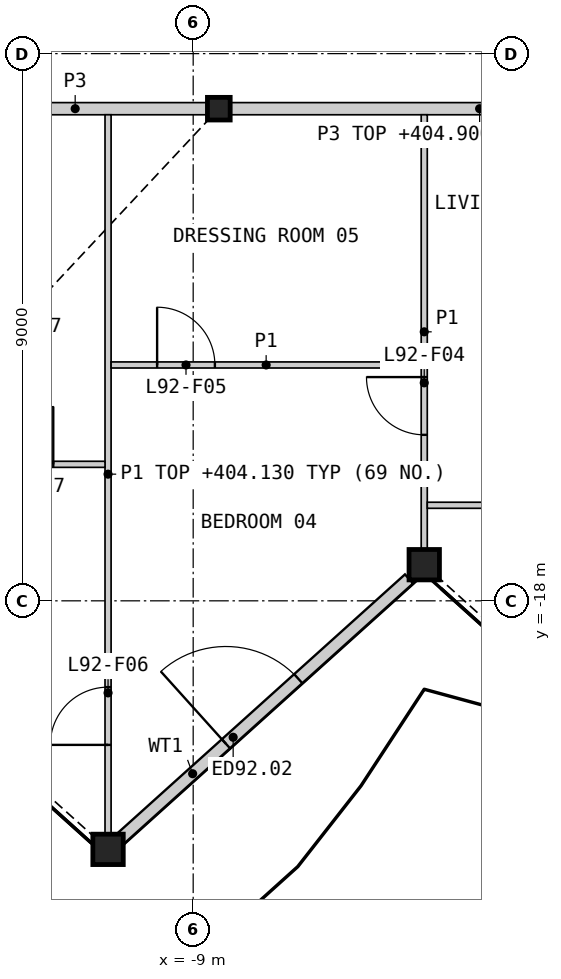
"""IFC4 building model, lengths in metres.
Left out: names, types, materials, properties, quantities, classifications, styles, units other than length and angle.
Written with IfcOpenShell. Run it as: python <this file> out.ifc"""

import sys

from ifc_helpers import new_model, si_unit, direction, frame, frame_2d, origin, origin_2d, place, context, subcontext, project, spatial, rectangle, hollow_rectangle, i_section, extrude, element, fill, save


model = new_model("IFC4")
c1 = context("Model", 3, precision=1e-05, world=origin(), true_north=direction((0.0, 1.0)))
c2 = subcontext(c1, "Body", "Model", "MODEL_VIEW")
j1 = project(units=[si_unit("LENGTHUNIT", "METRE"), si_unit("PLANEANGLEUNIT", "RADIAN")], contexts=[c1])
p1 = place(None, origin())
s1 = spatial("IfcSite", under=j1, at=p1, CompositionType="ELEMENT")
p2 = place(p1, origin())
s2 = spatial("IfcBuilding", under=s1, at=p2, CompositionType="ELEMENT")
p3 = place(p2, frame((0.0, 0.0, 401.8)))
s3 = spatial("IfcBuildingStorey", under=s2, at=p3, CompositionType="ELEMENT", Elevation=401.8)
for number, where, z_axis, x_axis in (
    (1, (-10.4, -22.088, 0.0), (0.0, 0.0, 1.0), (1.0, 0.0, 0.0)),
    (2, (-5.2, -17.406, 0.0), (0.0, 0.0, 1.0), (1.0, 0.0, 0.0)),
):
    element("IfcColumn", number, at=place(p3, frame(where, z_axis=z_axis, x_axis=x_axis)), inside=s3, PredefinedType="COLUMN", context=c2, shape_type="SweptSolid", body=[
        extrude(hollow_rectangle(XDim=0.5, YDim=0.5, WallThickness=0.03, at=origin_2d()), origin(), (0.0, 0.0, 1.0), 3.4),
    ])
p4 = place(p3, frame((-8.578, -9.906, 0.0), z_axis=(0.0, 0.0, 1.0), x_axis=(1.0, 0.0, 0.0)))
e3 = element("IfcColumn", 3, at=p4, inside=s3, PredefinedType="COLUMN", context=c2, shape_type="SweptSolid", body=[
    extrude(i_section(OverallWidth=0.374, OverallDepth=0.372, WebThickness=0.016, FlangeThickness=0.026, at=origin_2d()), origin(), (0.0, 0.0, 1.0), 3.4),
])
p5 = place(p3, frame((-10.195, -21.912, 0.0), z_axis=(0.0, 0.0, 1.0), x_axis=(0.743132515916, 0.669144277259, 0.0)))
e4 = element("IfcWall", 4, at=p5, inside=s3, PredefinedType="SOLIDWALL", context=c2, shape_type="SweptSolid", body=[
    extrude(rectangle(XDim=6.385, YDim=0.2, at=frame_2d((3.192, 0.0))), origin(), (0.0, 0.0, 1.0), 2.634),
])
p6 = place(p5, frame((2.333, 0.0, 0.0)))
e5 = element("IfcOpeningElement", 5, at=p6, cuts=e4, PredefinedType="OPENING", context=c2, shape_type="SweptSolid", body=[
    extrude(rectangle(XDim=1.6, YDim=2.25, at=frame_2d((0.8, 1.125))), frame((0.0, 0.11, 0.0), z_axis=(0.0, -1.0, 0.0), x_axis=(1.0, 0.0, 0.0)), (0.0, 0.0, 1.0), 0.22),
])
p7 = place(p3, frame((-8.382, -9.906, 0.0), z_axis=(0.0, 0.0, 1.0), x_axis=(1.0, 0.0, 0.0)))
e6 = element("IfcWall", 6, at=p7, inside=s3, PredefinedType="PARTITIONING", context=c2, shape_type="SweptSolid", body=[
    extrude(rectangle(XDim=8.185, YDim=0.2, at=frame_2d((4.092, 0.0))), origin(), (0.0, 0.0, 1.0), 3.1),
])
p8 = place(p7, frame((5.213, 0.0, 0.0)))
e7 = element("IfcOpeningElement", 7, at=p8, cuts=e6, PredefinedType="OPENING", context=c2, shape_type="SweptSolid", body=[
    extrude(rectangle(XDim=1.0, YDim=2.1, at=frame_2d((0.5, 1.05))), frame((0.0, 0.11, 0.0), z_axis=(0.0, -1.0, 0.0), x_axis=(1.0, 0.0, 0.0)), (0.0, 0.0, 1.0), 0.22),
])
p9 = place(p3, frame((-13.106, -9.906, 0.0), z_axis=(0.0, 0.0, 1.0), x_axis=(1.0, 0.0, 0.0)))
e8 = element("IfcWall", 8, at=p9, inside=s3, PredefinedType="PARTITIONING", context=c2, shape_type="SweptSolid", body=[
    extrude(rectangle(XDim=4.331, YDim=0.2, at=frame_2d((2.165, 0.0))), origin(), (0.0, 0.0, 1.0), 3.1),
])
p10 = place(p3, frame((-10.4, -21.828, 0.0), z_axis=(0.0, 0.0, 1.0), x_axis=(0.0, 1.0, 0.0)))
e9 = element("IfcWall", 9, at=p10, inside=s3, PredefinedType="PARTITIONING", context=c2, shape_type="SweptSolid", body=[
    extrude(rectangle(XDim=11.822, YDim=0.1, at=frame_2d((5.911, 0.0))), origin(), (0.0, 0.0, 1.0), 2.33),
])
p11 = place(p10, frame((1.458, 0.0, 0.0)))
e10 = element("IfcOpeningElement", 10, at=p11, cuts=e9, PredefinedType="OPENING", context=c2, shape_type="SweptSolid", body=[
    extrude(rectangle(XDim=0.95, YDim=2.1, at=frame_2d((0.475, 1.05))), frame((0.0, 0.06, 0.0), z_axis=(0.0, -1.0, 0.0), x_axis=(1.0, 0.0, 0.0)), (0.0, 0.0, 1.0), 0.12),
])
p12 = place(p3, frame((-5.2, -17.146, 0.0), z_axis=(0.0, 0.0, 1.0), x_axis=(0.0, 1.0, 0.0)))
e11 = element("IfcWall", 11, at=p12, inside=s3, PredefinedType="PARTITIONING", context=c2, shape_type="SweptSolid", body=[
    extrude(rectangle(XDim=7.14, YDim=0.1, at=frame_2d((3.57, 0.0))), origin(), (0.0, 0.0, 1.0), 2.33),
])
p13 = place(p12, frame((1.876, 0.0, 0.0)))
e12 = element("IfcOpeningElement", 12, at=p13, cuts=e11, PredefinedType="OPENING", context=c2, shape_type="SweptSolid", body=[
    extrude(rectangle(XDim=0.95, YDim=2.1, at=frame_2d((0.475, 1.05))), frame((0.0, 0.06, 0.0), z_axis=(0.0, -1.0, 0.0), x_axis=(1.0, 0.0, 0.0)), (0.0, 0.0, 1.0), 0.12),
])
p14 = place(p3, frame((-16.608, -15.755, 0.0), z_axis=(0.0, 0.0, 1.0), x_axis=(1.0, 0.0, 0.0)))
e13 = element("IfcWall", 13, at=p14, inside=s3, PredefinedType="PARTITIONING", context=c2, shape_type="SweptSolid", body=[
    extrude(rectangle(XDim=6.158, YDim=0.1, at=frame_2d((3.079, 0.0))), origin(), (0.0, 0.0, 1.0), 2.33),
])
p15 = place(p14, frame((4.357, 0.0, 0.0)))
e14 = element("IfcOpeningElement", 14, at=p15, cuts=e13, PredefinedType="OPENING", context=c2, shape_type="SweptSolid", body=[
    extrude(rectangle(XDim=0.95, YDim=2.1, at=frame_2d((0.475, 1.05))), frame((0.0, 0.06, 0.0), z_axis=(0.0, -1.0, 0.0), x_axis=(1.0, 0.0, 0.0)), (0.0, 0.0, 1.0), 0.12),
])
p16 = place(p3, frame((-5.15, -16.428, 0.0), z_axis=(0.0, 0.0, 1.0), x_axis=(1.0, 0.0, 0.0)))
e15 = element("IfcWall", 15, at=p16, inside=s3, PredefinedType="PARTITIONING", context=c2, shape_type="SweptSolid", body=[
    extrude(rectangle(XDim=5.025, YDim=0.1, at=frame_2d((2.512, 0.0))), origin(), (0.0, 0.0, 1.0), 2.33),
])
p17 = place(p16, frame((1.169, 0.0, 0.0)))
e16 = element("IfcOpeningElement", 16, at=p17, cuts=e15, PredefinedType="OPENING", context=c2, shape_type="SweptSolid", body=[
    extrude(rectangle(XDim=0.95, YDim=2.1, at=frame_2d((0.475, 1.05))), frame((0.0, 0.06, 0.0), z_axis=(0.0, -1.0, 0.0), x_axis=(1.0, 0.0, 0.0)), (0.0, 0.0, 1.0), 0.12),
])
p18 = place(p3, frame((-10.35, -14.121, 0.0), z_axis=(0.0, 0.0, 1.0), x_axis=(1.0, 0.0, 0.0)))
e17 = element("IfcWall", 17, at=p18, inside=s3, PredefinedType="PARTITIONING", context=c2, shape_type="SweptSolid", body=[
    extrude(rectangle(XDim=5.1, YDim=0.1, at=frame_2d((2.55, 0.0))), origin(), (0.0, 0.0, 1.0), 2.33),
])
p19 = place(p18, frame((0.757, 0.0, 0.0)))
e18 = element("IfcOpeningElement", 18, at=p19, cuts=e17, PredefinedType="OPENING", context=c2, shape_type="SweptSolid", body=[
    extrude(rectangle(XDim=0.95, YDim=2.1, at=frame_2d((0.475, 1.05))), frame((0.0, 0.06, 0.0), z_axis=(0.0, -1.0, 0.0), x_axis=(1.0, 0.0, 0.0)), (0.0, 0.0, 1.0), 0.12),
])
p20 = place(p6, origin())
e19 = element("IfcDoor", 19, at=p20, inside=s3, OperationType="DOUBLE_DOOR_SINGLE_SWING", PredefinedType="DOOR", context=c2, shape_type="SweptSolid", body=[
    extrude(rectangle(XDim=1.6, YDim=2.25, at=frame_2d((0.8, 1.125))), frame((0.0, 0.025, 0.0), z_axis=(0.0, -1.0, 0.0), x_axis=(1.0, 0.0, 0.0)), (0.0, 0.0, 1.0), 0.05),
])
fill(e5, e19)
p21 = place(p13, origin())
e20 = element("IfcDoor", 20, at=p21, inside=s3, OperationType="SINGLE_SWING_RIGHT", PredefinedType="DOOR", context=c2, shape_type="SweptSolid", body=[
    extrude(rectangle(XDim=0.95, YDim=2.1, at=frame_2d((0.475, 1.05))), frame((0.0, 0.025, 0.0), z_axis=(0.0, -1.0, 0.0), x_axis=(1.0, 0.0, 0.0)), (0.0, 0.0, 1.0), 0.05),
])
fill(e12, e20)
p22 = place(p19, origin())
e21 = element("IfcDoor", 21, at=p22, inside=s3, OperationType="SINGLE_SWING_LEFT", PredefinedType="DOOR", context=c2, shape_type="SweptSolid", body=[
    extrude(rectangle(XDim=0.95, YDim=2.1, at=frame_2d((0.475, 1.05))), frame((0.0, 0.025, 0.0), z_axis=(0.0, -1.0, 0.0), x_axis=(1.0, 0.0, 0.0)), (0.0, 0.0, 1.0), 0.05),
])
fill(e18, e21)
p23 = place(p11, origin())
e22 = element("IfcDoor", 22, at=p23, inside=s3, OperationType="SINGLE_SWING_LEFT", PredefinedType="DOOR", context=c2, shape_type="SweptSolid", body=[
    extrude(rectangle(XDim=0.95, YDim=2.1, at=frame_2d((0.475, 1.05))), frame((0.0, 0.025, 0.0), z_axis=(0.0, -1.0, 0.0), x_axis=(1.0, 0.0, 0.0)), (0.0, 0.0, 1.0), 0.05),
])
fill(e10, e22)
p24 = place(p15, origin())
e23 = element("IfcDoor", 23, at=p24, inside=s3, OperationType="SINGLE_SWING_RIGHT", PredefinedType="DOOR", context=c2, shape_type="SweptSolid", body=[
    extrude(rectangle(XDim=0.95, YDim=2.1, at=frame_2d((0.475, 1.05))), frame((0.0, 0.025, 0.0), z_axis=(0.0, -1.0, 0.0), x_axis=(1.0, 0.0, 0.0)), (0.0, 0.0, 1.0), 0.05),
])
fill(e14, e23)
save(model, sys.argv[1])
